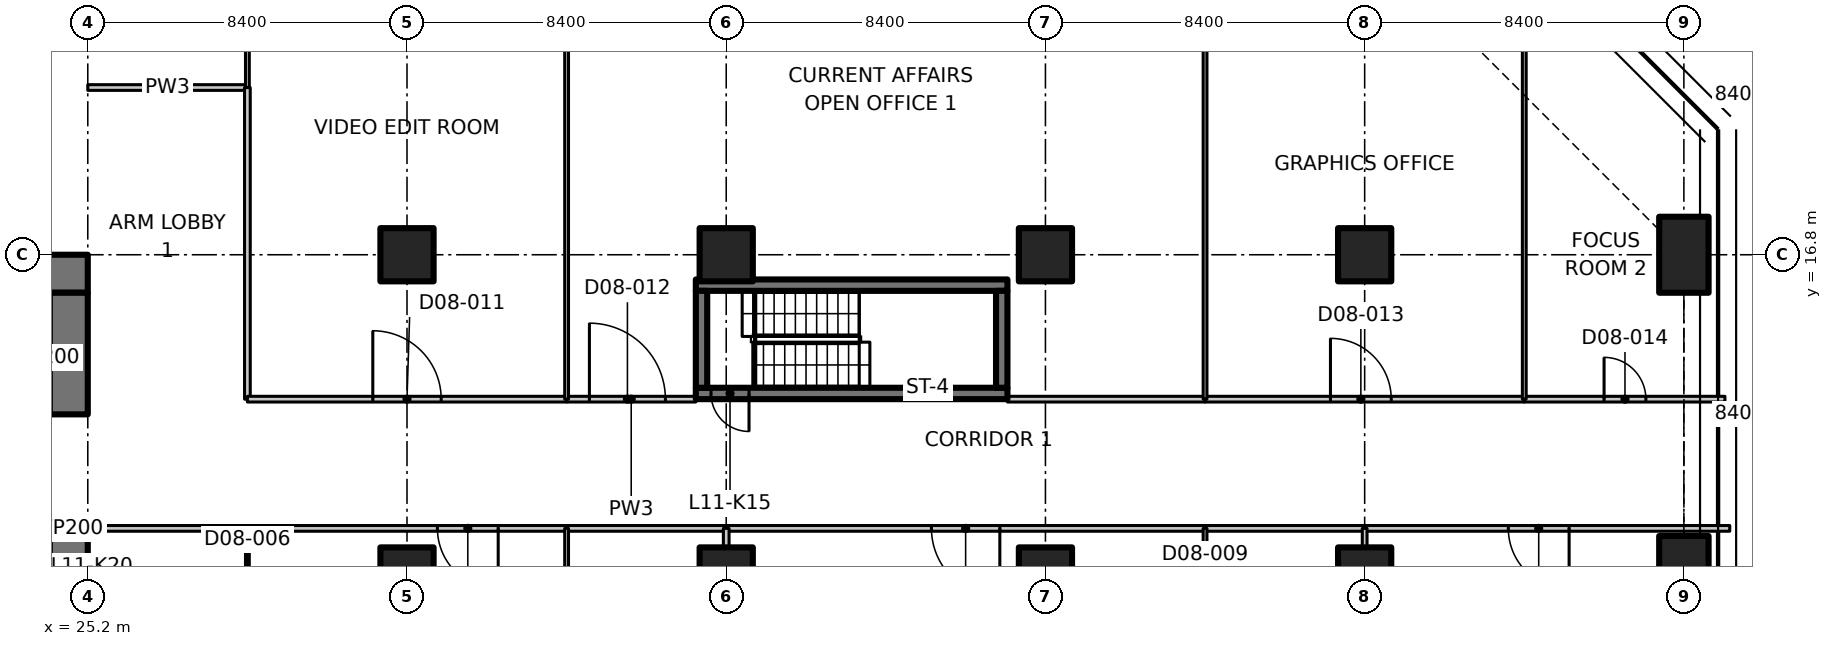
"""IFC4 building model, lengths in metres.
Left out: names, types, materials, properties, quantities, classifications, styles, units other than length and angle.
Written with IfcOpenShell. Run it as: python <this file> out.ifc"""

import sys

from ifc_helpers import new_model, si_unit, direction, frame, frame_2d, origin, origin_2d, place, context, subcontext, project, spatial, polyline, rectangle, outline, extrude, element, fill, save


model = new_model("IFC4")
c1 = context("Model", 3, precision=1e-05, world=origin(), true_north=direction((0.0, 1.0)))
c2 = subcontext(c1, "Body", "Model", "MODEL_VIEW")
j1 = project(units=[si_unit("LENGTHUNIT", "METRE"), si_unit("PLANEANGLEUNIT", "RADIAN")], contexts=[c1])
p1 = place(None, origin())
s1 = spatial("IfcSite", under=j1, at=p1, CompositionType="ELEMENT")
p2 = place(p1, origin())
s2 = spatial("IfcBuilding", under=s1, at=p2, CompositionType="ELEMENT")
p3 = place(p2, frame((0.0, 0.0, 54.5)))
s3 = spatial("IfcBuildingStorey", under=s2, at=p3, CompositionType="ELEMENT", Elevation=54.5)
for number, where, z_axis, x_axis in (
    (1, (33.6, 8.4, 0.0), (0.0, 0.0, 1.0), (1.0, 0.0, 0.0)),
    (2, (33.6, 16.8, 0.0), (0.0, 0.0, 1.0), (1.0, 0.0, 0.0)),
    (3, (42.0, 8.4, 0.0), (0.0, 0.0, 1.0), (1.0, 0.0, 0.0)),
    (4, (42.0, 16.8, 0.0), (0.0, 0.0, 1.0), (1.0, 0.0, 0.0)),
    (5, (50.4, 8.4, 0.0), (0.0, 0.0, 1.0), (1.0, 0.0, 0.0)),
    (6, (50.4, 16.8, 0.0), (0.0, 0.0, 1.0), (1.0, 0.0, 0.0)),
    (7, (58.8, 8.4, 0.0), (0.0, 0.0, 1.0), (1.0, 0.0, 0.0)),
    (8, (58.8, 16.8, 0.0), (0.0, 0.0, 1.0), (1.0, 0.0, 0.0)),
):
    element("IfcColumn", number, at=place(p3, frame(where, z_axis=z_axis, x_axis=x_axis)), inside=s3, PredefinedType="COLUMN", context=c2, shape_type="SweptSolid", body=[
        extrude(rectangle(XDim=1.4, YDim=1.4, at=origin_2d()), origin(), (0.0, 0.0, 1.0), 3.35),
    ])
for number, where, z_axis, x_axis in (
    (9, (67.2, 8.4, 0.0), (0.0, 0.0, 1.0), (1.0, 0.0, 0.0)),
    (10, (67.2, 16.8, 0.0), (0.0, 0.0, 1.0), (1.0, 0.0, 0.0)),
):
    element("IfcColumn", number, at=place(p3, frame(where, z_axis=z_axis, x_axis=x_axis)), inside=s3, PredefinedType="COLUMN", context=c2, shape_type="SweptSolid", body=[
        extrude(rectangle(XDim=1.3, YDim=2.0, at=origin_2d()), origin(), (0.0, 0.0, 1.0), 3.35),
    ])
p4 = place(p3, frame((23.8, 16.3, 0.0), z_axis=(0.0, 0.0, 1.0), x_axis=(1.0, 0.0, 0.0)))
e11 = element("IfcWall", 11, at=p4, inside=s3, PredefinedType="SHEAR", context=c2, shape_type="SweptSolid", body=[
    extrude(rectangle(XDim=1.4, YDim=1.0, at=frame_2d((0.7, 0.0))), origin(), (0.0, 0.0, 1.0), 3.35),
])
p5 = place(p3, frame((24.7, 1.0, 0.0), z_axis=(0.0, 0.0, 1.0), x_axis=(0.0, 1.0, 0.0)))
e12 = element("IfcWall", 12, at=p5, inside=s3, PredefinedType="SHEAR", context=c2, shape_type="SweptSolid", body=[
    extrude(rectangle(XDim=8.8, YDim=1.0, at=frame_2d((4.4, 0.0))), origin(), (0.0, 0.0, 1.0), 3.35),
])
p6 = place(p3, frame((24.7, 12.6, 0.0), z_axis=(0.0, 0.0, 1.0), x_axis=(0.0, 1.0, 0.0)))
e13 = element("IfcWall", 13, at=p6, inside=s3, PredefinedType="SHEAR", context=c2, shape_type="SweptSolid", body=[
    extrude(rectangle(XDim=3.2, YDim=1.0, at=frame_2d((1.6, 0.0))), origin(), (0.0, 0.0, 1.0), 3.35),
])
p7 = place(p3, frame((49.4, 13.15, 0.0), z_axis=(0.0, 0.0, 1.0), x_axis=(-1.0, 0.0, 0.0)))
e14 = element("IfcWall", 14, at=p7, inside=s3, PredefinedType="SHEAR", context=c2, shape_type="SweptSolid", body=[
    extrude(rectangle(XDim=8.2, YDim=0.3, at=frame_2d((4.1, 0.0))), origin(), (0.0, 0.0, 1.0), 3.35),
])
p8 = place(p7, frame((6.8, 0.0, 0.0)))
e15 = element("IfcOpeningElement", 15, at=p8, cuts=e14, PredefinedType="OPENING", context=c2, shape_type="SweptSolid", body=[
    extrude(rectangle(XDim=1.0, YDim=2.1, at=frame_2d((0.5, 1.05))), frame((0.0, 0.16, 0.0), z_axis=(0.0, -1.0, 0.0), x_axis=(1.0, 0.0, 0.0)), (0.0, 0.0, 1.0), 0.32),
])
p9 = place(p3, frame((41.2, 16.0, 0.0), z_axis=(0.0, 0.0, 1.0), x_axis=(1.0, 0.0, 0.0)))
e16 = element("IfcWall", 16, at=p9, inside=s3, PredefinedType="SHEAR", context=c2, shape_type="SweptSolid", body=[
    extrude(rectangle(XDim=8.2, YDim=0.3, at=frame_2d((4.1, 0.0))), origin(), (0.0, 0.0, 1.0), 3.35),
])
for number, where, z_axis, x_axis in (
    (17, (41.35, 13.3, 0.0), (0.0, 0.0, 1.0), (0.0, 1.0, 0.0)),
    (18, (49.25, 13.3, 0.0), (0.0, 0.0, 1.0), (0.0, 1.0, 0.0)),
):
    element("IfcWall", number, at=place(p3, frame(where, z_axis=z_axis, x_axis=x_axis)), inside=s3, PredefinedType="SHEAR", context=c2, shape_type="SweptSolid", body=[
        extrude(rectangle(XDim=2.55, YDim=0.3, at=frame_2d((1.275, 0.0))), origin(), (0.0, 0.0, 1.0), 3.35),
    ])
for number, where, z_axis, x_axis in (
    (19, (25.2, 21.2, 0.0), (0.0, 0.0, 1.0), (1.0, 0.0, 0.0)),
    (20, (29.4, 9.6, 0.0), (0.0, 0.0, 1.0), (-1.0, 0.0, 0.0)),
):
    element("IfcWall", number, at=place(p3, frame(where, z_axis=z_axis, x_axis=x_axis)), inside=s3, PredefinedType="PARTITIONING", context=c2, shape_type="SweptSolid", body=[
        extrude(rectangle(XDim=4.2, YDim=0.15, at=frame_2d((2.1, 0.0))), origin(), (0.0, 0.0, 1.0), 3.33),
    ])
p10 = place(p3, frame((29.4, 21.2, 0.0), z_axis=(0.0, 0.0, 1.0), x_axis=(0.0, -1.0, 0.0)))
e21 = element("IfcWall", 21, at=p10, inside=s3, PredefinedType="PARTITIONING", context=c2, shape_type="SweptSolid", body=[
    extrude(rectangle(XDim=8.2, YDim=0.15, at=frame_2d((4.1, 0.0))), origin(), (0.0, 0.0, 1.0), 3.33),
])
p11 = place(p3, frame((29.4, 27.511, 0.0), z_axis=(0.0, 0.0, 1.0), x_axis=(0.0, -1.0, 0.0)))
e22 = element("IfcWall", 22, at=p11, inside=s3, PredefinedType="PARTITIONING", context=c2, shape_type="SweptSolid", body=[
    extrude(outline(polyline([(0.0, 0.0), (6.311, 0.0), (6.311, 3.33), (2.761, 3.33), (2.759, 2.98), (1.863, 2.98), (1.861, 3.33), (0.236, 3.33), (0.0, 3.33), (0.0, 0.0)])), frame((0.0, 0.05, 0.0), z_axis=(0.0, -1.0, 0.0), x_axis=(1.0, 0.0, 0.0)), (0.0, 0.0, 1.0), 0.1),
])
p12 = place(p3, frame((37.8, 9.6, 0.0), z_axis=(0.0, 0.0, 1.0), x_axis=(-1.0, 0.0, 0.0)))
e23 = element("IfcWall", 23, at=p12, inside=s3, PredefinedType="PARTITIONING", context=c2, shape_type="SweptSolid", body=[
    extrude(rectangle(XDim=8.4, YDim=0.15, at=frame_2d((4.2, 0.0))), origin(), (0.0, 0.0, 1.0), 3.33),
])
p13 = place(p12, frame((1.8, 0.0, 0.0)))
e24 = element("IfcOpeningElement", 24, at=p13, cuts=e23, PredefinedType="OPENING", context=c2, shape_type="SweptSolid", body=[
    extrude(rectangle(XDim=1.6, YDim=2.1, at=frame_2d((0.8, 1.05))), frame((0.0, 0.085, 0.0), z_axis=(0.0, -1.0, 0.0), x_axis=(1.0, 0.0, 0.0)), (0.0, 0.0, 1.0), 0.17),
])
p14 = place(p3, frame((42.0, 9.6, 0.0), z_axis=(0.0, 0.0, 1.0), x_axis=(-1.0, 0.0, 0.0)))
e25 = element("IfcWall", 25, at=p14, inside=s3, PredefinedType="PARTITIONING", context=c2, shape_type="SweptSolid", body=[
    extrude(rectangle(XDim=4.2, YDim=0.15, at=frame_2d((2.1, 0.0))), origin(), (0.0, 0.0, 1.0), 3.33),
])
p15 = place(p3, frame((54.6, 9.6, 0.0), z_axis=(0.0, 0.0, 1.0), x_axis=(-1.0, 0.0, 0.0)))
e26 = element("IfcWall", 26, at=p15, inside=s3, PredefinedType="PARTITIONING", context=c2, shape_type="SweptSolid", body=[
    extrude(rectangle(XDim=12.6, YDim=0.15, at=frame_2d((6.3, 0.0))), origin(), (0.0, 0.0, 1.0), 3.33),
])
p16 = place(p15, frame((5.4, 0.0, 0.0)))
e27 = element("IfcOpeningElement", 27, at=p16, cuts=e26, PredefinedType="OPENING", context=c2, shape_type="SweptSolid", body=[
    extrude(rectangle(XDim=1.8, YDim=2.1, at=frame_2d((0.9, 1.05))), frame((0.0, 0.085, 0.0), z_axis=(0.0, -1.0, 0.0), x_axis=(1.0, 0.0, 0.0)), (0.0, 0.0, 1.0), 0.17),
])
p17 = place(p3, frame((58.8, 9.6, 0.0), z_axis=(0.0, 0.0, 1.0), x_axis=(-1.0, 0.0, 0.0)))
e28 = element("IfcWall", 28, at=p17, inside=s3, PredefinedType="PARTITIONING", context=c2, shape_type="SweptSolid", body=[
    extrude(rectangle(XDim=4.2, YDim=0.15, at=frame_2d((2.1, 0.0))), origin(), (0.0, 0.0, 1.0), 3.33),
])
p18 = place(p3, frame((68.407, 9.6, 0.0), z_axis=(0.0, 0.0, 1.0), x_axis=(-1.0, 0.0, 0.0)))
e29 = element("IfcWall", 29, at=p18, inside=s3, PredefinedType="PARTITIONING", context=c2, shape_type="SweptSolid", body=[
    extrude(outline(polyline([(0.0, 0.0), (9.607, 0.0), (9.607, 3.33), (1.657, 3.33), (1.655, 2.98), (0.759, 2.98), (0.757, 3.33), (0.127, 3.33), (0.0, 3.33), (0.0, 0.0)])), frame((0.0, 0.075, 0.0), z_axis=(0.0, -1.0, 0.0), x_axis=(1.0, 0.0, 0.0)), (0.0, 0.0, 1.0), 0.15),
])
p19 = place(p18, frame((4.227, 0.0, 0.0)))
e30 = element("IfcOpeningElement", 30, at=p19, cuts=e29, PredefinedType="OPENING", context=c2, shape_type="SweptSolid", body=[
    extrude(rectangle(XDim=1.6, YDim=2.1, at=frame_2d((0.8, 1.05))), frame((0.0, 0.085, 0.0), z_axis=(0.0, -1.0, 0.0), x_axis=(1.0, 0.0, 0.0)), (0.0, 0.0, 1.0), 0.17),
])
p20 = place(p3, frame((29.4, 13.0, 0.0), z_axis=(0.0, 0.0, 1.0), x_axis=(1.0, 0.0, 0.0)))
e31 = element("IfcWall", 31, at=p20, inside=s3, PredefinedType="PARTITIONING", context=c2, shape_type="SweptSolid", body=[
    extrude(rectangle(XDim=8.4, YDim=0.15, at=frame_2d((4.2, 0.0))), origin(), (0.0, 0.0, 1.0), 3.33),
])
p21 = place(p20, frame((3.3, 0.0, 0.0)))
e32 = element("IfcOpeningElement", 32, at=p21, cuts=e31, PredefinedType="OPENING", context=c2, shape_type="SweptSolid", body=[
    extrude(rectangle(XDim=1.8, YDim=2.1, at=frame_2d((0.9, 1.05))), frame((0.0, 0.085, 0.0), z_axis=(0.0, -1.0, 0.0), x_axis=(1.0, 0.0, 0.0)), (0.0, 0.0, 1.0), 0.17),
])
p22 = place(p3, frame((37.8, 13.0, 0.0), z_axis=(0.0, 0.0, 1.0), x_axis=(1.0, 0.0, 0.0)))
e33 = element("IfcWall", 33, at=p22, inside=s3, PredefinedType="PARTITIONING", context=c2, shape_type="SweptSolid", body=[
    extrude(rectangle(XDim=3.4, YDim=0.15, at=frame_2d((1.7, 0.0))), origin(), (0.0, 0.0, 1.0), 3.33),
])
p23 = place(p22, frame((0.6, 0.0, 0.0)))
e34 = element("IfcOpeningElement", 34, at=p23, cuts=e33, PredefinedType="OPENING", context=c2, shape_type="SweptSolid", body=[
    extrude(rectangle(XDim=2.0, YDim=2.4, at=frame_2d((1.0, 1.2))), frame((0.0, 0.085, 0.0), z_axis=(0.0, -1.0, 0.0), x_axis=(1.0, 0.0, 0.0)), (0.0, 0.0, 1.0), 0.17),
])
p24 = place(p3, frame((49.4, 13.0, 0.0), z_axis=(0.0, 0.0, 1.0), x_axis=(1.0, 0.0, 0.0)))
e35 = element("IfcWall", 35, at=p24, inside=s3, PredefinedType="PARTITIONING", context=c2, shape_type="SweptSolid", body=[
    extrude(rectangle(XDim=5.2, YDim=0.15, at=frame_2d((2.6, 0.0))), origin(), (0.0, 0.0, 1.0), 3.33),
])
p25 = place(p3, frame((54.6, 13.0, 0.0), z_axis=(0.0, 0.0, 1.0), x_axis=(1.0, 0.0, 0.0)))
e36 = element("IfcWall", 36, at=p25, inside=s3, PredefinedType="PARTITIONING", context=c2, shape_type="SweptSolid", body=[
    extrude(rectangle(XDim=8.4, YDim=0.15, at=frame_2d((4.2, 0.0))), origin(), (0.0, 0.0, 1.0), 3.33),
])
p26 = place(p25, frame((3.3, 0.0, 0.0)))
e37 = element("IfcOpeningElement", 37, at=p26, cuts=e36, PredefinedType="OPENING", context=c2, shape_type="SweptSolid", body=[
    extrude(rectangle(XDim=1.6, YDim=2.1, at=frame_2d((0.8, 1.05))), frame((0.0, 0.085, 0.0), z_axis=(0.0, -1.0, 0.0), x_axis=(1.0, 0.0, 0.0)), (0.0, 0.0, 1.0), 0.17),
])
p27 = place(p3, frame((63.0, 13.0, 0.0), z_axis=(0.0, 0.0, 1.0), x_axis=(1.0, 0.0, 0.0)))
e38 = element("IfcWall", 38, at=p27, inside=s3, PredefinedType="PARTITIONING", context=c2, shape_type="SweptSolid", body=[
    extrude(outline(polyline([(0.0, 0.0), (5.28, 0.0), (5.28, 3.33), (4.65, 3.33), (4.648, 2.98), (3.752, 2.98), (3.75, 3.33), (0.0, 3.33), (0.0, 0.0)])), frame((0.0, 0.075, 0.0), z_axis=(0.0, -1.0, 0.0), x_axis=(1.0, 0.0, 0.0)), (0.0, 0.0, 1.0), 0.15),
])
p28 = place(p27, frame((2.1, 0.0, 0.0)))
e39 = element("IfcOpeningElement", 39, at=p28, cuts=e38, PredefinedType="OPENING", context=c2, shape_type="SweptSolid", body=[
    extrude(rectangle(XDim=1.1, YDim=2.1, at=frame_2d((0.55, 1.05))), frame((0.0, 0.085, 0.0), z_axis=(0.0, -1.0, 0.0), x_axis=(1.0, 0.0, 0.0)), (0.0, 0.0, 1.0), 0.17),
])
p29 = place(p3, frame((37.8, 9.6, 0.0), z_axis=(0.0, 0.0, 1.0), x_axis=(0.0, -1.0, 0.0)))
e40 = element("IfcWall", 40, at=p29, inside=s3, PredefinedType="PARTITIONING", context=c2, shape_type="SweptSolid", body=[
    extrude(rectangle(XDim=5.4, YDim=0.1, at=frame_2d((2.7, 0.0))), origin(), (0.0, 0.0, 1.0), 3.33),
])
p30 = place(p29, frame((2.1, 0.0, 0.0)))
e41 = element("IfcOpeningElement", 41, at=p30, cuts=e40, PredefinedType="OPENING", context=c2, shape_type="SweptSolid", body=[
    extrude(rectangle(XDim=1.0, YDim=2.1, at=frame_2d((0.5, 1.05))), frame((0.0, 0.06, 0.0), z_axis=(0.0, -1.0, 0.0), x_axis=(1.0, 0.0, 0.0)), (0.0, 0.0, 1.0), 0.12),
])
p31 = place(p3, frame((29.4, 4.8, 0.0), z_axis=(0.0, 0.0, 1.0), x_axis=(0.0, 1.0, 0.0)))
e42 = element("IfcWall", 42, at=p31, inside=s3, PredefinedType="PARTITIONING", context=c2, shape_type="SweptSolid", body=[
    extrude(rectangle(XDim=4.8, YDim=0.1, at=frame_2d((2.4, 0.0))), origin(), (0.0, 0.0, 1.0), 3.33),
])
p32 = place(p31, frame((1.8, 0.0, 0.0)))
e43 = element("IfcOpeningElement", 43, at=p32, cuts=e42, PredefinedType="OPENING", context=c2, shape_type="SweptSolid", body=[
    extrude(rectangle(XDim=1.0, YDim=2.1, at=frame_2d((0.5, 1.05))), frame((0.0, 0.06, 0.0), z_axis=(0.0, -1.0, 0.0), x_axis=(1.0, 0.0, 0.0)), (0.0, 0.0, 1.0), 0.12),
])
p33 = place(p3, frame((42.0, 9.6, 0.0), z_axis=(0.0, 0.0, 1.0), x_axis=(0.0, -1.0, 0.0)))
e44 = element("IfcWall", 44, at=p33, inside=s3, PredefinedType="PARTITIONING", context=c2, shape_type="SweptSolid", body=[
    extrude(rectangle(XDim=0.48, YDim=0.15, at=frame_2d((0.24, 0.0))), origin(), (0.0, 0.0, 1.0), 3.33),
])
p34 = place(p3, frame((54.6, 9.6, 0.0), z_axis=(0.0, 0.0, 1.0), x_axis=(0.0, -1.0, 0.0)))
e45 = element("IfcWall", 45, at=p34, inside=s3, PredefinedType="PARTITIONING", context=c2, shape_type="SweptSolid", body=[
    extrude(rectangle(XDim=6.0, YDim=0.1, at=frame_2d((3.0, 0.0))), origin(), (0.0, 0.0, 1.0), 3.33),
])
p35 = place(p34, frame((2.4, 0.0, 0.0)))
e46 = element("IfcOpeningElement", 46, at=p35, cuts=e45, PredefinedType="OPENING", context=c2, shape_type="SweptSolid", body=[
    extrude(rectangle(XDim=1.0, YDim=2.1, at=frame_2d((0.5, 1.05))), frame((0.0, 0.06, 0.0), z_axis=(0.0, -1.0, 0.0), x_axis=(1.0, 0.0, 0.0)), (0.0, 0.0, 1.0), 0.12),
])
p36 = place(p3, frame((58.8, 9.6, 0.0), z_axis=(0.0, 0.0, 1.0), x_axis=(0.0, -1.0, 0.0)))
e47 = element("IfcWall", 47, at=p36, inside=s3, PredefinedType="PARTITIONING", context=c2, shape_type="SweptSolid", body=[
    extrude(rectangle(XDim=0.48, YDim=0.125, at=frame_2d((0.24, 0.0))), origin(), (0.0, 0.0, 1.0), 3.33),
])
p37 = place(p3, frame((37.8, 30.526, 0.0), z_axis=(0.0, 0.0, 1.0), x_axis=(0.0, -1.0, 0.0)))
e48 = element("IfcWall", 48, at=p37, inside=s3, PredefinedType="PARTITIONING", context=c2, shape_type="SweptSolid", body=[
    extrude(outline(polyline([(0.0, 0.0), (17.526, 0.0), (17.526, 3.33), (5.776, 3.33), (5.774, 2.98), (4.878, 2.98), (4.876, 3.33), (0.283, 3.33), (0.0, 3.33), (0.0, 0.0)])), frame((0.0, 0.05, 0.0), z_axis=(0.0, -1.0, 0.0), x_axis=(1.0, 0.0, 0.0)), (0.0, 0.0, 1.0), 0.1),
])
p38 = place(p3, frame((54.6, 26.565, 0.0), z_axis=(0.0, 0.0, 1.0), x_axis=(0.0, -1.0, 0.0)))
e49 = element("IfcWall", 49, at=p38, inside=s3, PredefinedType="PARTITIONING", context=c2, shape_type="SweptSolid", body=[
    extrude(outline(polyline([(0.0, 0.0), (13.565, 0.0), (13.565, 3.33), (1.815, 3.33), (1.813, 2.98), (0.917, 2.98), (0.915, 3.33), (0.265, 3.33), (0.0, 3.33), (0.0, 0.0)])), frame((0.0, 0.05, 0.0), z_axis=(0.0, -1.0, 0.0), x_axis=(1.0, 0.0, 0.0)), (0.0, 0.0, 1.0), 0.1),
])
p39 = place(p3, frame((63.0, 25.4, 0.0), z_axis=(0.0, 0.0, 1.0), x_axis=(0.0, -1.0, 0.0)))
e50 = element("IfcWall", 50, at=p39, inside=s3, PredefinedType="PARTITIONING", context=c2, shape_type="SweptSolid", body=[
    extrude(outline(polyline([(0.0, 0.0), (12.4, 0.0), (12.4, 3.33), (5.066, 3.33), (5.064, 2.98), (3.736, 2.98), (3.734, 3.33), (0.0, 3.33), (0.0, 0.0)])), frame((0.0, 0.05, 0.0), z_axis=(0.0, -1.0, 0.0), x_axis=(1.0, 0.0, 0.0)), (0.0, 0.0, 1.0), 0.1),
])
p40 = place(p8, origin())
e51 = element("IfcDoor", 51, at=p40, inside=s3, OperationType="SINGLE_SWING_RIGHT", PredefinedType="DOOR", context=c2, shape_type="SweptSolid", body=[
    extrude(rectangle(XDim=1.0, YDim=2.1, at=frame_2d((0.5, 1.05))), frame((0.0, 0.025, 0.0), z_axis=(0.0, -1.0, 0.0), x_axis=(1.0, 0.0, 0.0)), (0.0, 0.0, 1.0), 0.05),
])
fill(e15, e51)
p41 = place(p13, origin())
e52 = element("IfcDoor", 52, at=p41, inside=s3, OperationType="DOUBLE_DOOR_SINGLE_SWING", PredefinedType="DOOR", context=c2, shape_type="SweptSolid", body=[
    extrude(rectangle(XDim=1.6, YDim=2.1, at=frame_2d((0.8, 1.05))), frame((0.0, 0.025, 0.0), z_axis=(0.0, -1.0, 0.0), x_axis=(1.0, 0.0, 0.0)), (0.0, 0.0, 1.0), 0.05),
])
fill(e24, e52)
p42 = place(p16, origin())
e53 = element("IfcDoor", 53, at=p42, inside=s3, OperationType="DOUBLE_DOOR_SINGLE_SWING", PredefinedType="DOOR", context=c2, shape_type="SweptSolid", body=[
    extrude(rectangle(XDim=1.8, YDim=2.1, at=frame_2d((0.9, 1.05))), frame((0.0, 0.025, 0.0), z_axis=(0.0, -1.0, 0.0), x_axis=(1.0, 0.0, 0.0)), (0.0, 0.0, 1.0), 0.05),
])
fill(e27, e53)
p43 = place(p19, origin())
e54 = element("IfcDoor", 54, at=p43, inside=s3, OperationType="DOUBLE_DOOR_SINGLE_SWING", PredefinedType="DOOR", context=c2, shape_type="SweptSolid", body=[
    extrude(rectangle(XDim=1.6, YDim=2.1, at=frame_2d((0.8, 1.05))), frame((0.0, 0.025, 0.0), z_axis=(0.0, -1.0, 0.0), x_axis=(1.0, 0.0, 0.0)), (0.0, 0.0, 1.0), 0.05),
])
fill(e30, e54)
p44 = place(p21, origin())
e55 = element("IfcDoor", 55, at=p44, inside=s3, OperationType="DOUBLE_DOOR_SINGLE_SWING", PredefinedType="DOOR", context=c2, shape_type="SweptSolid", body=[
    extrude(rectangle(XDim=1.8, YDim=2.1, at=frame_2d((0.9, 1.05))), frame((0.0, 0.025, 0.0), z_axis=(0.0, -1.0, 0.0), x_axis=(1.0, 0.0, 0.0)), (0.0, 0.0, 1.0), 0.05),
])
fill(e32, e55)
p45 = place(p23, origin())
e56 = element("IfcDoor", 56, at=p45, inside=s3, OperationType="DOUBLE_DOOR_SINGLE_SWING", PredefinedType="DOOR", context=c2, shape_type="SweptSolid", body=[
    extrude(rectangle(XDim=2.0, YDim=2.4, at=frame_2d((1.0, 1.2))), frame((0.0, 0.025, 0.0), z_axis=(0.0, -1.0, 0.0), x_axis=(1.0, 0.0, 0.0)), (0.0, 0.0, 1.0), 0.05),
])
fill(e34, e56)
p46 = place(p26, origin())
e57 = element("IfcDoor", 57, at=p46, inside=s3, OperationType="DOUBLE_DOOR_SINGLE_SWING", PredefinedType="DOOR", context=c2, shape_type="SweptSolid", body=[
    extrude(rectangle(XDim=1.6, YDim=2.1, at=frame_2d((0.8, 1.05))), frame((0.0, 0.025, 0.0), z_axis=(0.0, -1.0, 0.0), x_axis=(1.0, 0.0, 0.0)), (0.0, 0.0, 1.0), 0.05),
])
fill(e37, e57)
p47 = place(p28, origin())
e58 = element("IfcDoor", 58, at=p47, inside=s3, OperationType="SINGLE_SWING_LEFT", PredefinedType="DOOR", context=c2, shape_type="SweptSolid", body=[
    extrude(rectangle(XDim=1.1, YDim=2.1, at=frame_2d((0.55, 1.05))), frame((0.0, 0.025, 0.0), z_axis=(0.0, -1.0, 0.0), x_axis=(1.0, 0.0, 0.0)), (0.0, 0.0, 1.0), 0.05),
])
fill(e39, e58)
save(model, sys.argv[1])
